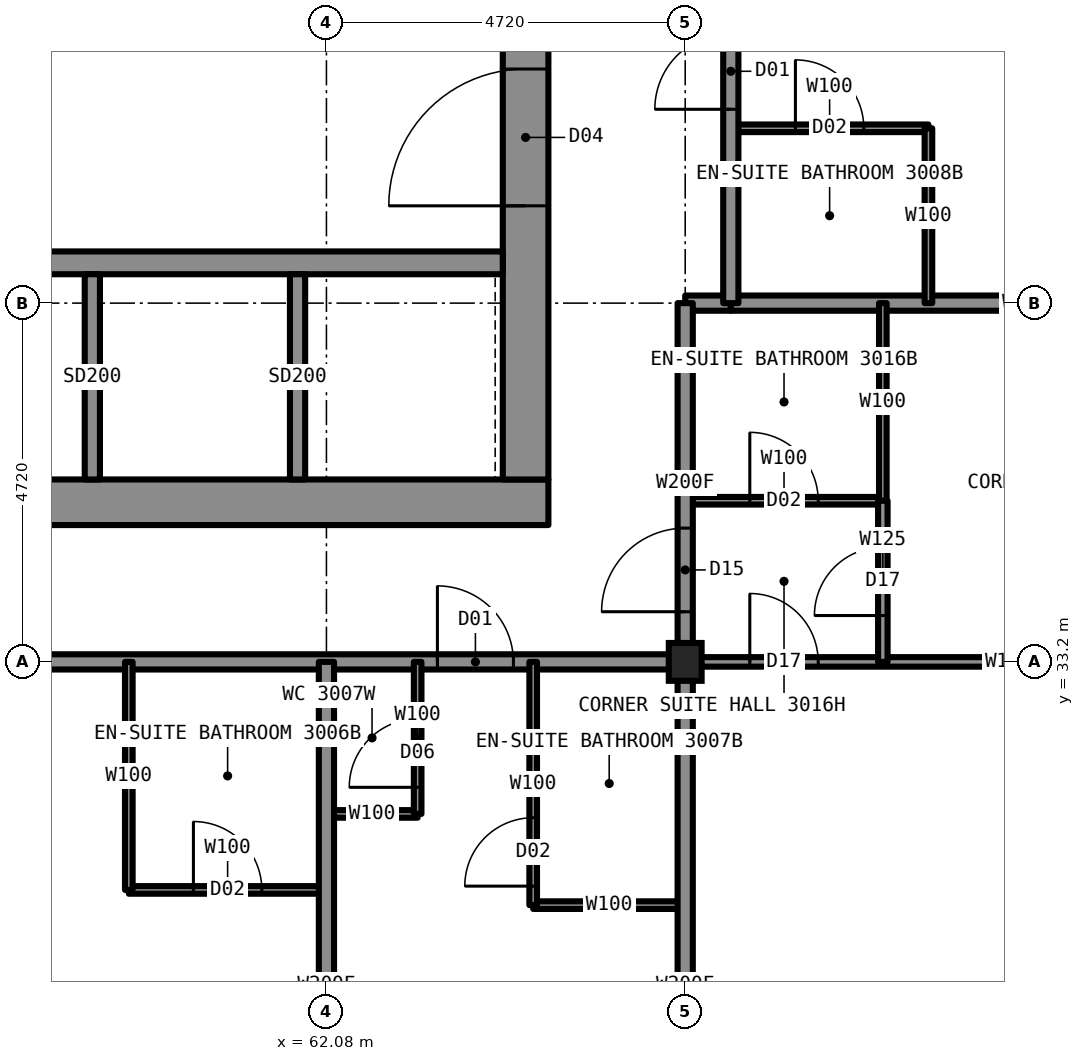
"""IFC4 building model, lengths in metres.
Left out: names, types, materials, properties, quantities, classifications, styles, units other than length and angle.
Written with IfcOpenShell. Run it as: python <this file> out.ifc"""

import sys

from ifc_helpers import new_model, si_unit, direction, frame, frame_2d, origin, origin_2d, place, context, subcontext, project, spatial, rectangle, i_section, extrude, element, fill, save


model = new_model("IFC4")
c1 = context("Model", 3, precision=1e-05, world=origin(), true_north=direction((0.0, 1.0)))
c2 = subcontext(c1, "Body", "Model", "MODEL_VIEW")
j1 = project(units=[si_unit("LENGTHUNIT", "METRE"), si_unit("PLANEANGLEUNIT", "RADIAN")], contexts=[c1])
p1 = place(None, origin())
s1 = spatial("IfcSite", under=j1, at=p1, CompositionType="ELEMENT")
p2 = place(p1, origin())
s2 = spatial("IfcBuilding", under=s1, at=p2, CompositionType="ELEMENT")
p3 = place(p2, frame((0.0, 0.0, 114.4)))
s3 = spatial("IfcBuildingStorey", under=s2, at=p3, CompositionType="ELEMENT", Elevation=114.4)
p4 = place(p3, frame((66.8, 33.2, 0.0), z_axis=(0.0, 0.0, 1.0), x_axis=(1.0, 0.0, 0.0)))
e1 = element("IfcColumn", 1, at=p4, inside=s3, PredefinedType="COLUMN", context=c2, shape_type="SweptSolid", body=[
    extrude(i_section(OverallWidth=0.432, OverallDepth=0.498, WebThickness=0.056, FlangeThickness=0.089, at=origin_2d()), origin(), (0.0, 0.0, 1.0), 3.5),
])
p5 = place(p3, frame((45.0, 35.3, 0.0), z_axis=(0.0, 0.0, 1.0), x_axis=(1.0, 0.0, 0.0)))
e2 = element("IfcWall", 2, at=p5, inside=s3, PredefinedType="SHEAR", context=c2, shape_type="SweptSolid", body=[
    extrude(rectangle(XDim=20.0, YDim=0.6, at=frame_2d((10.0, 0.0))), origin(), (0.0, 0.0, 1.0), 3.5),
])
p6 = place(p3, frame((64.7, 35.6, 0.0), z_axis=(0.0, 0.0, 1.0), x_axis=(0.0, 1.0, 0.0)))
e3 = element("IfcWall", 3, at=p6, inside=s3, PredefinedType="SHEAR", context=c2, shape_type="SweptSolid", body=[
    extrude(rectangle(XDim=18.8, YDim=0.6, at=frame_2d((9.4, 0.0))), origin(), (0.0, 0.0, 1.0), 3.5),
])
p7 = place(p6, frame((13.4, 0.0, 0.0)))
e4 = element("IfcOpeningElement", 4, at=p7, cuts=e3, PredefinedType="OPENING", context=c2, shape_type="SweptSolid", body=[
    extrude(rectangle(XDim=1.8, YDim=2.2, at=frame_2d((0.9, 1.1))), frame((0.0, 0.31, 0.0), z_axis=(0.0, -1.0, 0.0), x_axis=(1.0, 0.0, 0.0)), (0.0, 0.0, 1.0), 0.62),
])
p8 = place(p6, frame((3.6, 0.0, 0.0)))
e5 = element("IfcOpeningElement", 5, at=p8, cuts=e3, PredefinedType="OPENING", context=c2, shape_type="SweptSolid", body=[
    extrude(rectangle(XDim=1.8, YDim=2.2, at=frame_2d((0.9, 1.1))), frame((0.0, 0.31, 0.0), z_axis=(0.0, -1.0, 0.0), x_axis=(1.0, 0.0, 0.0)), (0.0, 0.0, 1.0), 0.62),
])
p9 = place(p3, frame((45.6, 38.45, 0.0), z_axis=(0.0, 0.0, 1.0), x_axis=(1.0, 0.0, 0.0)))
e6 = element("IfcWall", 6, at=p9, inside=s3, PredefinedType="SHEAR", context=c2, shape_type="SweptSolid", body=[
    extrude(rectangle(XDim=18.8, YDim=0.3, at=frame_2d((9.4, 0.0))), origin(), (0.0, 0.0, 1.0), 3.5),
])
p10 = place(p3, frame((43.2, 33.2, 0.0), z_axis=(0.0, 0.0, 1.0), x_axis=(1.0, 0.0, 0.0)))
e7 = element("IfcWall", 7, at=p10, inside=s3, PredefinedType="PARTITIONING", context=c2, shape_type="SweptSolid", body=[
    extrude(rectangle(XDim=23.6, YDim=0.2, at=frame_2d((11.8, 0.0))), origin(), (0.0, 0.0, 1.0), 3.33),
])
p11 = place(p10, frame((0.7, 0.0, 0.0)))
e8 = element("IfcOpeningElement", 8, at=p11, cuts=e7, PredefinedType="OPENING", context=c2, shape_type="SweptSolid", body=[
    extrude(rectangle(XDim=1.0, YDim=2.2, at=frame_2d((0.5, 1.1))), frame((0.0, 0.11, 0.0), z_axis=(0.0, -1.0, 0.0), x_axis=(1.0, 0.0, 0.0)), (0.0, 0.0, 1.0), 0.22),
])
p12 = place(p10, frame((6.57, 0.0, 0.0)))
e9 = element("IfcOpeningElement", 9, at=p12, cuts=e7, PredefinedType="OPENING", context=c2, shape_type="SweptSolid", body=[
    extrude(rectangle(XDim=1.1, YDim=2.2, at=frame_2d((0.55, 1.1))), frame((0.0, 0.11, 0.0), z_axis=(0.0, -1.0, 0.0), x_axis=(1.0, 0.0, 0.0)), (0.0, 0.0, 1.0), 0.22),
])
p13 = place(p10, frame((20.34, 0.0, 0.0)))
e10 = element("IfcOpeningElement", 10, at=p13, cuts=e7, PredefinedType="OPENING", context=c2, shape_type="SweptSolid", body=[
    extrude(rectangle(XDim=1.0, YDim=2.2, at=frame_2d((0.5, 1.1))), frame((0.0, 0.11, 0.0), z_axis=(0.0, -1.0, 0.0), x_axis=(1.0, 0.0, 0.0)), (0.0, 0.0, 1.0), 0.22),
])
p14 = place(p3, frame((66.8, 33.2, 0.0), z_axis=(0.0, 0.0, 1.0), x_axis=(1.0, 0.0, 0.0)))
e11 = element("IfcWall", 11, at=p14, inside=s3, PredefinedType="PARTITIONING", context=c2, shape_type="SweptSolid", body=[
    extrude(rectangle(XDim=8.5, YDim=0.125, at=frame_2d((4.25, 0.0))), origin(), (0.0, 0.0, 1.0), 2.573),
])
p15 = place(p14, frame((0.85, 0.0, 0.0)))
e12 = element("IfcOpeningElement", 12, at=p15, cuts=e11, PredefinedType="OPENING", context=c2, shape_type="SweptSolid", body=[
    extrude(rectangle(XDim=0.9, YDim=2.2, at=frame_2d((0.45, 1.1))), frame((0.0, 0.073, 0.0), z_axis=(0.0, -1.0, 0.0), x_axis=(1.0, 0.0, 0.0)), (0.0, 0.0, 1.0), 0.145),
])
p16 = place(p3, frame((62.08, 31.2, 0.0), z_axis=(0.0, 0.0, 1.0), x_axis=(1.0, 0.0, 0.0)))
e13 = element("IfcWall", 13, at=p16, inside=s3, PredefinedType="PARTITIONING", context=c2, shape_type="SweptSolid", body=[
    extrude(rectangle(XDim=1.2, YDim=0.1, at=frame_2d((0.6, 0.0))), origin(), (0.0, 0.0, 1.0), 3.33),
])
p17 = place(p3, frame((59.48, 30.2, 0.0), z_axis=(0.0, 0.0, 1.0), x_axis=(1.0, 0.0, 0.0)))
e14 = element("IfcWall", 14, at=p17, inside=s3, PredefinedType="PARTITIONING", context=c2, shape_type="SweptSolid", body=[
    extrude(rectangle(XDim=2.6, YDim=0.1, at=frame_2d((1.3, 0.0))), origin(), (0.0, 0.0, 1.0), 3.33),
])
p18 = place(p17, frame((0.85, 0.0, 0.0)))
e15 = element("IfcOpeningElement", 15, at=p18, cuts=e14, PredefinedType="OPENING", context=c2, shape_type="SweptSolid", body=[
    extrude(rectangle(XDim=0.9, YDim=2.1, at=frame_2d((0.45, 1.05))), frame((0.0, 0.06, 0.0), z_axis=(0.0, -1.0, 0.0), x_axis=(1.0, 0.0, 0.0)), (0.0, 0.0, 1.0), 0.12),
])
p19 = place(p3, frame((64.8, 30.0, 0.0), z_axis=(0.0, 0.0, 1.0), x_axis=(1.0, 0.0, 0.0)))
e16 = element("IfcWall", 16, at=p19, inside=s3, PredefinedType="PARTITIONING", context=c2, shape_type="SweptSolid", body=[
    extrude(rectangle(XDim=2.0, YDim=0.1, at=frame_2d((1.0, 0.0))), origin(), (0.0, 0.0, 1.0), 2.731),
])
p20 = place(p3, frame((67.4, 40.22, 0.0), z_axis=(0.0, 0.0, 1.0), x_axis=(1.0, 0.0, 0.0)))
e17 = element("IfcWall", 17, at=p20, inside=s3, PredefinedType="PARTITIONING", context=c2, shape_type="SweptSolid", body=[
    extrude(rectangle(XDim=2.6, YDim=0.1, at=frame_2d((1.3, 0.0))), origin(), (0.0, 0.0, 1.0), 2.731),
])
p21 = place(p20, frame((0.85, 0.0, 0.0)))
e18 = element("IfcOpeningElement", 18, at=p21, cuts=e17, PredefinedType="OPENING", context=c2, shape_type="SweptSolid", body=[
    extrude(rectangle(XDim=0.9, YDim=2.1, at=frame_2d((0.45, 1.05))), frame((0.0, 0.06, 0.0), z_axis=(0.0, -1.0, 0.0), x_axis=(1.0, 0.0, 0.0)), (0.0, 0.0, 1.0), 0.12),
])
p22 = place(p3, frame((66.8, 37.92, 0.0), z_axis=(0.0, 0.0, 1.0), x_axis=(1.0, 0.0, 0.0)))
e19 = element("IfcWall", 19, at=p22, inside=s3, PredefinedType="PARTITIONING", context=c2, shape_type="SweptSolid", body=[
    extrude(rectangle(XDim=0.6, YDim=0.2, at=frame_2d((0.3, 0.0))), origin(), (0.0, 0.0, 1.0), 2.573),
])
p23 = place(p3, frame((67.4, 37.92, 0.0), z_axis=(0.0, 0.0, 1.0), x_axis=(1.0, 0.0, 0.0)))
e20 = element("IfcWall", 20, at=p23, inside=s3, PredefinedType="PARTITIONING", context=c2, shape_type="SweptSolid", body=[
    extrude(rectangle(XDim=7.9, YDim=0.2, at=frame_2d((3.95, 0.0))), origin(), (0.0, 0.0, 1.0), 2.573),
])
p24 = place(p3, frame((66.8, 35.32, 0.0), z_axis=(0.0, 0.0, 1.0), x_axis=(1.0, 0.0, 0.0)))
e21 = element("IfcWall", 21, at=p24, inside=s3, PredefinedType="PARTITIONING", context=c2, shape_type="SweptSolid", body=[
    extrude(rectangle(XDim=2.6, YDim=0.1, at=frame_2d((1.3, 0.0))), origin(), (0.0, 0.0, 1.0), 3.33),
])
p25 = place(p24, frame((0.85, 0.0, 0.0)))
e22 = element("IfcOpeningElement", 22, at=p25, cuts=e21, PredefinedType="OPENING", context=c2, shape_type="SweptSolid", body=[
    extrude(rectangle(XDim=0.9, YDim=2.1, at=frame_2d((0.45, 1.05))), frame((0.0, 0.06, 0.0), z_axis=(0.0, -1.0, 0.0), x_axis=(1.0, 0.0, 0.0)), (0.0, 0.0, 1.0), 0.12),
])
p26 = place(p3, frame((66.8, 33.2, 0.0), z_axis=(0.0, 0.0, 1.0), x_axis=(0.0, 1.0, 0.0)))
e23 = element("IfcWall", 23, at=p26, inside=s3, PredefinedType="PARTITIONING", context=c2, shape_type="SweptSolid", body=[
    extrude(rectangle(XDim=4.72, YDim=0.2, at=frame_2d((2.36, 0.0))), origin(), (0.0, 0.0, 1.0), 3.33),
])
p27 = place(p26, frame((0.66, 0.0, 0.0)))
e24 = element("IfcOpeningElement", 24, at=p27, cuts=e23, PredefinedType="OPENING", context=c2, shape_type="SweptSolid", body=[
    extrude(rectangle(XDim=1.1, YDim=2.2, at=frame_2d((0.55, 1.1))), frame((0.0, 0.11, 0.0), z_axis=(0.0, -1.0, 0.0), x_axis=(1.0, 0.0, 0.0)), (0.0, 0.0, 1.0), 0.22),
])
p28 = place(p3, frame((66.8, 24.7, 0.0), z_axis=(0.0, 0.0, 1.0), x_axis=(0.0, 1.0, 0.0)))
e25 = element("IfcWall", 25, at=p28, inside=s3, PredefinedType="PARTITIONING", context=c2, shape_type="SweptSolid", body=[
    extrude(rectangle(XDim=8.5, YDim=0.2, at=frame_2d((4.25, 0.0))), origin(), (0.0, 0.0, 1.0), 2.573),
])
p29 = place(p3, frame((67.4, 37.92, 0.0), z_axis=(0.0, 0.0, 1.0), x_axis=(0.0, 1.0, 0.0)))
e26 = element("IfcWall", 26, at=p29, inside=s3, PredefinedType="PARTITIONING", context=c2, shape_type="SweptSolid", body=[
    extrude(rectangle(XDim=14.16, YDim=0.2, at=frame_2d((7.08, 0.0))), origin(), (0.0, 0.0, 1.0), 3.33),
])
p30 = place(p29, frame((2.55, 0.0, 0.0)))
e27 = element("IfcOpeningElement", 27, at=p30, cuts=e26, PredefinedType="OPENING", context=c2, shape_type="SweptSolid", body=[
    extrude(rectangle(XDim=1.0, YDim=2.2, at=frame_2d((0.5, 1.1))), frame((0.0, 0.11, 0.0), z_axis=(0.0, -1.0, 0.0), x_axis=(1.0, 0.0, 0.0)), (0.0, 0.0, 1.0), 0.22),
])
p31 = place(p29, frame((6.18, 0.0, 0.0)))
e28 = element("IfcOpeningElement", 28, at=p31, cuts=e26, PredefinedType="OPENING", context=c2, shape_type="SweptSolid", body=[
    extrude(rectangle(XDim=1.0, YDim=2.2, at=frame_2d((0.5, 1.1))), frame((0.0, 0.11, 0.0), z_axis=(0.0, -1.0, 0.0), x_axis=(1.0, 0.0, 0.0)), (0.0, 0.0, 1.0), 0.22),
])
p32 = place(p29, frame((9.84, 0.0, 0.0)))
e29 = element("IfcOpeningElement", 29, at=p32, cuts=e26, PredefinedType="OPENING", context=c2, shape_type="SweptSolid", body=[
    extrude(rectangle(XDim=1.0, YDim=2.2, at=frame_2d((0.5, 1.1))), frame((0.0, 0.11, 0.0), z_axis=(0.0, -1.0, 0.0), x_axis=(1.0, 0.0, 0.0)), (0.0, 0.0, 1.0), 0.22),
])
p33 = place(p3, frame((69.4, 35.32, 0.0), z_axis=(0.0, 0.0, 1.0), x_axis=(0.0, 1.0, 0.0)))
e30 = element("IfcWall", 30, at=p33, inside=s3, PredefinedType="PARTITIONING", context=c2, shape_type="SweptSolid", body=[
    extrude(rectangle(XDim=2.6, YDim=0.1, at=frame_2d((1.3, 0.0))), origin(), (0.0, 0.0, 1.0), 3.33),
])
p34 = place(p3, frame((69.4, 33.2, 0.0), z_axis=(0.0, 0.0, 1.0), x_axis=(0.0, 1.0, 0.0)))
e31 = element("IfcWall", 31, at=p34, inside=s3, PredefinedType="PARTITIONING", context=c2, shape_type="SweptSolid", body=[
    extrude(rectangle(XDim=2.12, YDim=0.125, at=frame_2d((1.06, 0.0))), origin(), (0.0, 0.0, 1.0), 3.33),
])
p35 = place(p34, frame((0.61, 0.0, 0.0)))
e32 = element("IfcOpeningElement", 32, at=p35, cuts=e31, PredefinedType="OPENING", context=c2, shape_type="SweptSolid", body=[
    extrude(rectangle(XDim=0.9, YDim=2.2, at=frame_2d((0.45, 1.1))), frame((0.0, 0.073, 0.0), z_axis=(0.0, -1.0, 0.0), x_axis=(1.0, 0.0, 0.0)), (0.0, 0.0, 1.0), 0.145),
])
p36 = place(p3, frame((70.0, 37.92, 0.0), z_axis=(0.0, 0.0, 1.0), x_axis=(0.0, 1.0, 0.0)))
e33 = element("IfcWall", 33, at=p36, inside=s3, PredefinedType="PARTITIONING", context=c2, shape_type="SweptSolid", body=[
    extrude(rectangle(XDim=2.3, YDim=0.1, at=frame_2d((1.15, 0.0))), origin(), (0.0, 0.0, 1.0), 3.33),
])
p37 = place(p3, frame((59.48, 30.2, 0.0), z_axis=(0.0, 0.0, 1.0), x_axis=(0.0, 1.0, 0.0)))
e34 = element("IfcWall", 34, at=p37, inside=s3, PredefinedType="PARTITIONING", context=c2, shape_type="SweptSolid", body=[
    extrude(rectangle(XDim=3.0, YDim=0.1, at=frame_2d((1.5, 0.0))), origin(), (0.0, 0.0, 1.0), 3.33),
])
p38 = place(p3, frame((62.08, 24.7, 0.0), z_axis=(0.0, 0.0, 1.0), x_axis=(0.0, 1.0, 0.0)))
e35 = element("IfcWall", 35, at=p38, inside=s3, PredefinedType="PARTITIONING", context=c2, shape_type="SweptSolid", body=[
    extrude(rectangle(XDim=8.5, YDim=0.2, at=frame_2d((4.25, 0.0))), origin(), (0.0, 0.0, 1.0), 2.573),
])
p39 = place(p3, frame((63.28, 31.2, 0.0), z_axis=(0.0, 0.0, 1.0), x_axis=(0.0, 1.0, 0.0)))
e36 = element("IfcWall", 36, at=p39, inside=s3, PredefinedType="PARTITIONING", context=c2, shape_type="SweptSolid", body=[
    extrude(rectangle(XDim=2.0, YDim=0.1, at=frame_2d((1.0, 0.0))), origin(), (0.0, 0.0, 1.0), 3.33),
])
p40 = place(p39, frame((0.35, 0.0, 0.0)))
e37 = element("IfcOpeningElement", 37, at=p40, cuts=e36, PredefinedType="OPENING", context=c2, shape_type="SweptSolid", body=[
    extrude(rectangle(XDim=0.9, YDim=2.1, at=frame_2d((0.45, 1.05))), frame((0.0, 0.06, 0.0), z_axis=(0.0, -1.0, 0.0), x_axis=(1.0, 0.0, 0.0)), (0.0, 0.0, 1.0), 0.12),
])
p41 = place(p3, frame((64.8, 30.0, 0.0), z_axis=(0.0, 0.0, 1.0), x_axis=(0.0, 1.0, 0.0)))
e38 = element("IfcWall", 38, at=p41, inside=s3, PredefinedType="PARTITIONING", context=c2, shape_type="SweptSolid", body=[
    extrude(rectangle(XDim=3.2, YDim=0.1, at=frame_2d((1.6, 0.0))), origin(), (0.0, 0.0, 1.0), 3.33),
])
p42 = place(p41, frame((0.25, 0.0, 0.0)))
e39 = element("IfcOpeningElement", 39, at=p42, cuts=e38, PredefinedType="OPENING", context=c2, shape_type="SweptSolid", body=[
    extrude(rectangle(XDim=0.9, YDim=2.1, at=frame_2d((0.45, 1.05))), frame((0.0, 0.06, 0.0), z_axis=(0.0, -1.0, 0.0), x_axis=(1.0, 0.0, 0.0)), (0.0, 0.0, 1.0), 0.12),
])
for number, where, z_axis, x_axis in (
    (40, (59.0, 35.6, 0.0), (0.0, 0.0, 1.0), (0.0, 1.0, 0.0)),
    (41, (61.7, 35.6, 0.0), (0.0, 0.0, 1.0), (0.0, 1.0, 0.0)),
):
    element("IfcWall", number, at=place(p3, frame(where, z_axis=z_axis, x_axis=x_axis)), inside=s3, PredefinedType="PARTITIONING", context=c2, shape_type="SweptSolid", body=[
        extrude(rectangle(XDim=2.7, YDim=0.2, at=frame_2d((1.35, 0.0))), origin(), (0.0, 0.0, 1.0), 3.33),
    ])
p43 = place(p18, origin())
e42 = element("IfcDoor", 42, at=p43, inside=s3, OperationType="SINGLE_SWING_RIGHT", PredefinedType="DOOR", context=c2, shape_type="SweptSolid", body=[
    extrude(rectangle(XDim=0.9, YDim=2.1, at=frame_2d((0.45, 1.05))), frame((0.0, 0.025, 0.0), z_axis=(0.0, -1.0, 0.0), x_axis=(1.0, 0.0, 0.0)), (0.0, 0.0, 1.0), 0.05),
])
fill(e15, e42)
p44 = place(p13, origin())
e43 = element("IfcDoor", 43, at=p44, inside=s3, OperationType="SINGLE_SWING_LEFT", PredefinedType="DOOR", context=c2, shape_type="SweptSolid", body=[
    extrude(rectangle(XDim=1.0, YDim=2.2, at=frame_2d((0.5, 1.1))), frame((0.0, 0.025, 0.0), z_axis=(0.0, -1.0, 0.0), x_axis=(1.0, 0.0, 0.0)), (0.0, 0.0, 1.0), 0.05),
])
fill(e10, e43)
p45 = place(p42, origin())
e44 = element("IfcDoor", 44, at=p45, inside=s3, OperationType="SINGLE_SWING_RIGHT", PredefinedType="DOOR", context=c2, shape_type="SweptSolid", body=[
    extrude(rectangle(XDim=0.9, YDim=2.1, at=frame_2d((0.45, 1.05))), frame((0.0, 0.025, 0.0), z_axis=(0.0, -1.0, 0.0), x_axis=(1.0, 0.0, 0.0)), (0.0, 0.0, 1.0), 0.05),
])
fill(e39, e44)
p46 = place(p40, origin())
e45 = element("IfcDoor", 45, at=p46, inside=s3, OperationType="SINGLE_SWING_LEFT", PredefinedType="DOOR", context=c2, shape_type="SweptSolid", body=[
    extrude(rectangle(XDim=0.9, YDim=2.1, at=frame_2d((0.45, 1.05))), frame((0.0, 0.025, 0.0), z_axis=(0.0, -1.0, 0.0), x_axis=(1.0, 0.0, 0.0)), (0.0, 0.0, 1.0), 0.05),
])
fill(e37, e45)
p47 = place(p30, origin())
e46 = element("IfcDoor", 46, at=p47, inside=s3, OperationType="SINGLE_SWING_LEFT", PredefinedType="DOOR", context=c2, shape_type="SweptSolid", body=[
    extrude(rectangle(XDim=1.0, YDim=2.2, at=frame_2d((0.5, 1.1))), frame((0.0, 0.025, 0.0), z_axis=(0.0, -1.0, 0.0), x_axis=(1.0, 0.0, 0.0)), (0.0, 0.0, 1.0), 0.05),
])
fill(e27, e46)
p48 = place(p21, origin())
e47 = element("IfcDoor", 47, at=p48, inside=s3, OperationType="SINGLE_SWING_RIGHT", PredefinedType="DOOR", context=c2, shape_type="SweptSolid", body=[
    extrude(rectangle(XDim=0.9, YDim=2.1, at=frame_2d((0.45, 1.05))), frame((0.0, 0.025, 0.0), z_axis=(0.0, -1.0, 0.0), x_axis=(1.0, 0.0, 0.0)), (0.0, 0.0, 1.0), 0.05),
])
fill(e18, e47)
p49 = place(p15, origin())
e48 = element("IfcDoor", 48, at=p49, inside=s3, OperationType="SINGLE_SWING_LEFT", PredefinedType="DOOR", context=c2, shape_type="SweptSolid", body=[
    extrude(rectangle(XDim=0.9, YDim=2.2, at=frame_2d((0.45, 1.1))), frame((0.0, 0.025, 0.0), z_axis=(0.0, -1.0, 0.0), x_axis=(1.0, 0.0, 0.0)), (0.0, 0.0, 1.0), 0.05),
])
fill(e12, e48)
p50 = place(p25, origin())
e49 = element("IfcDoor", 49, at=p50, inside=s3, OperationType="SINGLE_SWING_RIGHT", PredefinedType="DOOR", context=c2, shape_type="SweptSolid", body=[
    extrude(rectangle(XDim=0.9, YDim=2.1, at=frame_2d((0.45, 1.05))), frame((0.0, 0.025, 0.0), z_axis=(0.0, -1.0, 0.0), x_axis=(1.0, 0.0, 0.0)), (0.0, 0.0, 1.0), 0.05),
])
fill(e22, e49)
p51 = place(p27, origin())
e50 = element("IfcDoor", 50, at=p51, inside=s3, OperationType="SINGLE_SWING_LEFT", PredefinedType="DOOR", context=c2, shape_type="SweptSolid", body=[
    extrude(rectangle(XDim=1.1, YDim=2.2, at=frame_2d((0.55, 1.1))), frame((0.0, 0.025, 0.0), z_axis=(0.0, -1.0, 0.0), x_axis=(1.0, 0.0, 0.0)), (0.0, 0.0, 1.0), 0.05),
])
fill(e24, e50)
p52 = place(p35, origin())
e51 = element("IfcDoor", 51, at=p52, inside=s3, OperationType="SINGLE_SWING_LEFT", PredefinedType="DOOR", context=c2, shape_type="SweptSolid", body=[
    extrude(rectangle(XDim=0.9, YDim=2.2, at=frame_2d((0.45, 1.1))), frame((0.0, 0.025, 0.0), z_axis=(0.0, -1.0, 0.0), x_axis=(1.0, 0.0, 0.0)), (0.0, 0.0, 1.0), 0.05),
])
fill(e32, e51)
p53 = place(p8, origin())
e52 = element("IfcDoor", 52, at=p53, inside=s3, OperationType="DOUBLE_DOOR_SINGLE_SWING", PredefinedType="DOOR", context=c2, shape_type="SweptSolid", body=[
    extrude(rectangle(XDim=1.8, YDim=2.2, at=frame_2d((0.9, 1.1))), frame((0.0, 0.025, 0.0), z_axis=(0.0, -1.0, 0.0), x_axis=(1.0, 0.0, 0.0)), (0.0, 0.0, 1.0), 0.05),
])
fill(e5, e52)
save(model, sys.argv[1])
